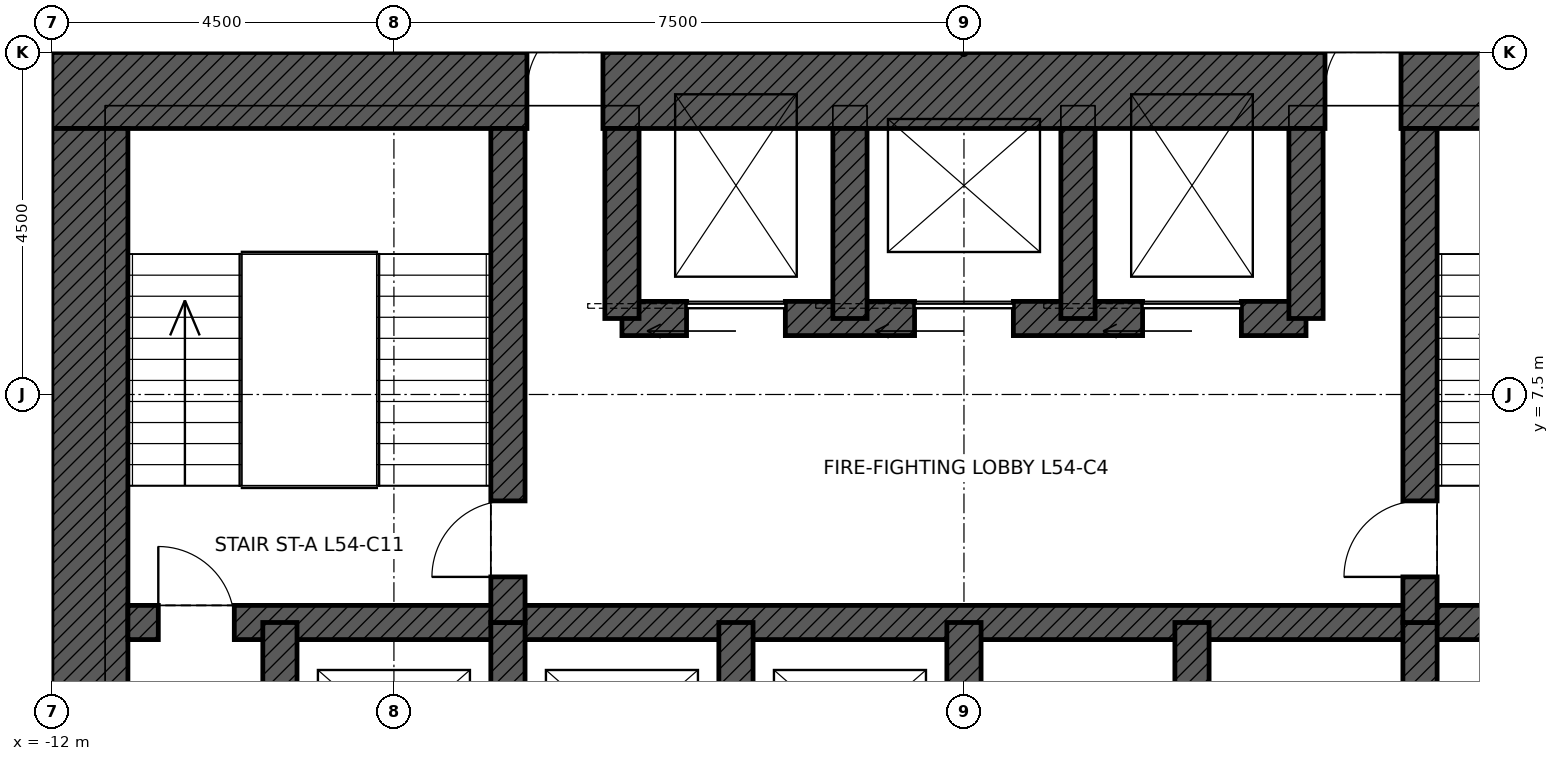
"""IFC4 building model, lengths in metres.
Left out: names, types, materials, properties, quantities, classifications, styles, units other than length and angle.
Written with IfcOpenShell. Run it as: python <this file> out.ifc"""

import sys

from ifc_helpers import new_model, si_unit, direction, frame, frame_2d, origin, place, context, subcontext, project, spatial, rectangle, extrude, element, fill, save


model = new_model("IFC4")
c1 = context("Model", 3, precision=1e-05, world=origin(), true_north=direction((0.0, 1.0)))
c2 = subcontext(c1, "Body", "Model", "MODEL_VIEW")
j1 = project(units=[si_unit("LENGTHUNIT", "METRE"), si_unit("PLANEANGLEUNIT", "RADIAN")], contexts=[c1])
p1 = place(None, origin())
s1 = spatial("IfcSite", under=j1, at=p1, CompositionType="ELEMENT")
p2 = place(p1, origin())
s2 = spatial("IfcBuilding", under=s1, at=p2, CompositionType="ELEMENT")
p3 = place(p2, frame((0.0, 0.0, 249.9)))
s3 = spatial("IfcBuildingStorey", under=s2, at=p3, CompositionType="ELEMENT", Elevation=249.9)
p4 = place(p3, frame((-12.0, 11.5, 0.0), z_axis=(0.0, 0.0, 1.0), x_axis=(1.0, 0.0, 0.0)))
e1 = element("IfcWall", 1, at=p4, inside=s3, PredefinedType="SHEAR", context=c2, shape_type="SweptSolid", body=[
    extrude(rectangle(XDim=24.0, YDim=1.0, at=frame_2d((12.0, 0.0))), origin(), (0.0, 0.0, 1.0), 4.0),
])
p5 = place(p4, frame((6.25, 0.0, 0.0)))
e2 = element("IfcOpeningElement", 2, at=p5, cuts=e1, PredefinedType="OPENING", context=c2, shape_type="SweptSolid", body=[
    extrude(rectangle(XDim=1.0, YDim=2.4, at=frame_2d((0.5, 1.2))), frame((0.0, 0.51, 0.0), z_axis=(0.0, -1.0, 0.0), x_axis=(1.0, 0.0, 0.0)), (0.0, 0.0, 1.0), 1.02),
])
p6 = place(p4, frame((16.75, 0.0, 0.0)))
e3 = element("IfcOpeningElement", 3, at=p6, cuts=e1, PredefinedType="OPENING", context=c2, shape_type="SweptSolid", body=[
    extrude(rectangle(XDim=1.0, YDim=2.4, at=frame_2d((0.5, 1.2))), frame((0.0, 0.51, 0.0), z_axis=(0.0, -1.0, 0.0), x_axis=(1.0, 0.0, 0.0)), (0.0, 0.0, 1.0), 1.02),
])
p7 = place(p3, frame((-11.5, -11.0, 0.0), z_axis=(0.0, 0.0, 1.0), x_axis=(0.0, 1.0, 0.0)))
e4 = element("IfcWall", 4, at=p7, inside=s3, PredefinedType="SHEAR", context=c2, shape_type="SweptSolid", body=[
    extrude(rectangle(XDim=22.0, YDim=1.0, at=frame_2d((11.0, 0.0))), origin(), (0.0, 0.0, 1.0), 4.0),
])
p8 = place(p7, frame((10.5, 0.0, 0.0)))
e5 = element("IfcOpeningElement", 5, at=p8, cuts=e4, PredefinedType="OPENING", context=c2, shape_type="SweptSolid", body=[
    extrude(rectangle(XDim=1.0, YDim=2.4, at=frame_2d((0.5, 1.2))), frame((0.0, 0.51, 0.0), z_axis=(0.0, -1.0, 0.0), x_axis=(1.0, 0.0, 0.0)), (0.0, 0.0, 1.0), 1.02),
])
p9 = place(p3, frame((-11.0, 4.5, 0.0), z_axis=(0.0, 0.0, 1.0), x_axis=(1.0, 0.0, 0.0)))
e6 = element("IfcWall", 6, at=p9, inside=s3, PredefinedType="SHEAR", context=c2, shape_type="SweptSolid", body=[
    extrude(rectangle(XDim=22.0, YDim=0.45, at=frame_2d((11.0, 0.0))), origin(), (0.0, 0.0, 1.0), 4.0),
])
p10 = place(p9, frame((0.4, 0.0, 0.0)))
e7 = element("IfcOpeningElement", 7, at=p10, cuts=e6, PredefinedType="OPENING", context=c2, shape_type="SweptSolid", body=[
    extrude(rectangle(XDim=1.0, YDim=2.1, at=frame_2d((0.5, 1.05))), frame((0.0, 0.235, 0.0), z_axis=(0.0, -1.0, 0.0), x_axis=(1.0, 0.0, 0.0)), (0.0, 0.0, 1.0), 0.47),
])
p11 = place(p9, frame((20.6, 0.0, 0.0)))
e8 = element("IfcOpeningElement", 8, at=p11, cuts=e6, PredefinedType="OPENING", context=c2, shape_type="SweptSolid", body=[
    extrude(rectangle(XDim=1.0, YDim=2.1, at=frame_2d((0.5, 1.05))), frame((0.0, 0.235, 0.0), z_axis=(0.0, -1.0, 0.0), x_axis=(1.0, 0.0, 0.0)), (0.0, 0.0, 1.0), 0.47),
])
p12 = place(p3, frame((-4.5, 8.5, 0.0), z_axis=(0.0, 0.0, 1.0), x_axis=(1.0, 0.0, 0.0)))
e9 = element("IfcWall", 9, at=p12, inside=s3, PredefinedType="SHEAR", context=c2, shape_type="SweptSolid", body=[
    extrude(rectangle(XDim=9.0, YDim=0.45, at=frame_2d((4.5, 0.0))), origin(), (0.0, 0.0, 1.0), 4.0),
])
p13 = place(p12, frame((0.85, 0.0, 0.0)))
e10 = element("IfcOpeningElement", 10, at=p13, cuts=e9, PredefinedType="OPENING", context=c2, shape_type="SweptSolid", body=[
    extrude(rectangle(XDim=1.3, YDim=2.4, at=frame_2d((0.65, 1.2))), frame((0.0, 0.235, 0.0), z_axis=(0.0, -1.0, 0.0), x_axis=(1.0, 0.0, 0.0)), (0.0, 0.0, 1.0), 0.47),
])
p14 = place(p12, frame((6.85, 0.0, 0.0)))
e11 = element("IfcOpeningElement", 11, at=p14, cuts=e9, PredefinedType="OPENING", context=c2, shape_type="SweptSolid", body=[
    extrude(rectangle(XDim=1.3, YDim=2.4, at=frame_2d((0.65, 1.2))), frame((0.0, 0.235, 0.0), z_axis=(0.0, -1.0, 0.0), x_axis=(1.0, 0.0, 0.0)), (0.0, 0.0, 1.0), 0.47),
])
p15 = place(p12, frame((3.85, 0.0, 0.0)))
e12 = element("IfcOpeningElement", 12, at=p15, cuts=e9, PredefinedType="OPENING", context=c2, shape_type="SweptSolid", body=[
    extrude(rectangle(XDim=1.3, YDim=2.4, at=frame_2d((0.65, 1.2))), frame((0.0, 0.235, 0.0), z_axis=(0.0, -1.0, 0.0), x_axis=(1.0, 0.0, 0.0)), (0.0, 0.0, 1.0), 0.47),
])
for number, where, z_axis, x_axis in (
    (13, (-9.0, 1.5, 0.0), (0.0, 0.0, 1.0), (0.0, 1.0, 0.0)),
    (14, (-6.0, 1.5, 0.0), (0.0, 0.0, 1.0), (0.0, 1.0, 0.0)),
    (15, (-3.0, 1.5, 0.0), (0.0, 0.0, 1.0), (0.0, 1.0, 0.0)),
    (16, (0.0, 1.5, 0.0), (0.0, 0.0, 1.0), (0.0, 1.0, 0.0)),
    (17, (3.0, 1.5, 0.0), (0.0, 0.0, 1.0), (0.0, 1.0, 0.0)),
    (18, (6.0, 1.5, 0.0), (0.0, 0.0, 1.0), (0.0, 1.0, 0.0)),
):
    element("IfcWall", number, at=place(p3, frame(where, z_axis=z_axis, x_axis=x_axis)), inside=s3, PredefinedType="SHEAR", context=c2, shape_type="SweptSolid", body=[
        extrude(rectangle(XDim=3.0, YDim=0.45, at=frame_2d((1.5, 0.0))), origin(), (0.0, 0.0, 1.0), 4.0),
    ])
p16 = place(p3, frame((-6.0, 4.5, 0.0), z_axis=(0.0, 0.0, 1.0), x_axis=(0.0, 1.0, 0.0)))
e19 = element("IfcWall", 19, at=p16, inside=s3, PredefinedType="SHEAR", context=c2, shape_type="SweptSolid", body=[
    extrude(rectangle(XDim=6.5, YDim=0.45, at=frame_2d((3.25, 0.0))), origin(), (0.0, 0.0, 1.0), 4.0),
])
p17 = place(p16, frame((0.6, 0.0, 0.0)))
e20 = element("IfcOpeningElement", 20, at=p17, cuts=e19, PredefinedType="OPENING", context=c2, shape_type="SweptSolid", body=[
    extrude(rectangle(XDim=1.0, YDim=2.1, at=frame_2d((0.5, 1.05))), frame((0.0, 0.235, 0.0), z_axis=(0.0, -1.0, 0.0), x_axis=(1.0, 0.0, 0.0)), (0.0, 0.0, 1.0), 0.47),
])
p18 = place(p3, frame((6.0, 4.5, 0.0), z_axis=(0.0, 0.0, 1.0), x_axis=(0.0, 1.0, 0.0)))
e21 = element("IfcWall", 21, at=p18, inside=s3, PredefinedType="SHEAR", context=c2, shape_type="SweptSolid", body=[
    extrude(rectangle(XDim=6.5, YDim=0.45, at=frame_2d((3.25, 0.0))), origin(), (0.0, 0.0, 1.0), 4.0),
])
p19 = place(p18, frame((0.6, 0.0, 0.0)))
e22 = element("IfcOpeningElement", 22, at=p19, cuts=e21, PredefinedType="OPENING", context=c2, shape_type="SweptSolid", body=[
    extrude(rectangle(XDim=1.0, YDim=2.1, at=frame_2d((0.5, 1.05))), frame((0.0, 0.235, 0.0), z_axis=(0.0, -1.0, 0.0), x_axis=(1.0, 0.0, 0.0)), (0.0, 0.0, 1.0), 0.47),
])
for number, where, z_axis, x_axis in (
    (23, (-4.5, 8.5, 0.0), (0.0, 0.0, 1.0), (0.0, 1.0, 0.0)),
    (24, (4.5, 8.5, 0.0), (0.0, 0.0, 1.0), (0.0, 1.0, 0.0)),
    (25, (-1.5, 8.5, 0.0), (0.0, 0.0, 1.0), (0.0, 1.0, 0.0)),
    (26, (1.5, 8.5, 0.0), (0.0, 0.0, 1.0), (0.0, 1.0, 0.0)),
):
    element("IfcWall", number, at=place(p3, frame(where, z_axis=z_axis, x_axis=x_axis)), inside=s3, PredefinedType="SHEAR", context=c2, shape_type="SweptSolid", body=[
        extrude(rectangle(XDim=2.5, YDim=0.45, at=frame_2d((1.25, 0.0))), origin(), (0.0, 0.0, 1.0), 4.0),
    ])
p20 = place(p10, origin())
e27 = element("IfcDoor", 27, at=p20, inside=s3, OperationType="SINGLE_SWING_LEFT", PredefinedType="DOOR", context=c2, shape_type="SweptSolid", body=[
    extrude(rectangle(XDim=1.0, YDim=2.1, at=frame_2d((0.5, 1.05))), frame((0.0, 0.025, 0.0), z_axis=(0.0, -1.0, 0.0), x_axis=(1.0, 0.0, 0.0)), (0.0, 0.0, 1.0), 0.05),
])
fill(e7, e27)
p21 = place(p17, origin())
e28 = element("IfcDoor", 28, at=p21, inside=s3, OperationType="SINGLE_SWING_LEFT", PredefinedType="DOOR", context=c2, shape_type="SweptSolid", body=[
    extrude(rectangle(XDim=1.0, YDim=2.1, at=frame_2d((0.5, 1.05))), frame((0.0, 0.025, 0.0), z_axis=(0.0, -1.0, 0.0), x_axis=(1.0, 0.0, 0.0)), (0.0, 0.0, 1.0), 0.05),
])
fill(e20, e28)
p22 = place(p19, origin())
e29 = element("IfcDoor", 29, at=p22, inside=s3, OperationType="SINGLE_SWING_LEFT", PredefinedType="DOOR", context=c2, shape_type="SweptSolid", body=[
    extrude(rectangle(XDim=1.0, YDim=2.1, at=frame_2d((0.5, 1.05))), frame((0.0, 0.025, 0.0), z_axis=(0.0, -1.0, 0.0), x_axis=(1.0, 0.0, 0.0)), (0.0, 0.0, 1.0), 0.05),
])
fill(e22, e29)
p23 = place(p5, origin())
e30 = element("IfcDoor", 30, at=p23, inside=s3, OperationType="SINGLE_SWING_RIGHT", PredefinedType="DOOR", context=c2, shape_type="SweptSolid", body=[
    extrude(rectangle(XDim=1.0, YDim=2.4, at=frame_2d((0.5, 1.2))), frame((0.0, 0.485, 0.0), z_axis=(0.0, -1.0, 0.0), x_axis=(1.0, 0.0, 0.0)), (0.0, 0.0, 1.0), 0.05),
])
fill(e2, e30)
p24 = place(p6, origin())
e31 = element("IfcDoor", 31, at=p24, inside=s3, OperationType="SINGLE_SWING_RIGHT", PredefinedType="DOOR", context=c2, shape_type="SweptSolid", body=[
    extrude(rectangle(XDim=1.0, YDim=2.4, at=frame_2d((0.5, 1.2))), frame((0.0, 0.485, 0.0), z_axis=(0.0, -1.0, 0.0), x_axis=(1.0, 0.0, 0.0)), (0.0, 0.0, 1.0), 0.05),
])
fill(e3, e31)
p25 = place(p13, origin())
e32 = element("IfcDoor", 32, at=p25, inside=s3, OperationType="SLIDING_TO_LEFT", PredefinedType="DOOR", context=c2, shape_type="SweptSolid", body=[
    extrude(rectangle(XDim=1.3, YDim=2.4, at=frame_2d((0.65, 1.2))), frame((0.0, 0.025, 0.0), z_axis=(0.0, -1.0, 0.0), x_axis=(1.0, 0.0, 0.0)), (0.0, 0.0, 1.0), 0.05),
])
fill(e10, e32)
p26 = place(p14, origin())
e33 = element("IfcDoor", 33, at=p26, inside=s3, OperationType="SLIDING_TO_LEFT", PredefinedType="DOOR", context=c2, shape_type="SweptSolid", body=[
    extrude(rectangle(XDim=1.3, YDim=2.4, at=frame_2d((0.65, 1.2))), frame((0.0, 0.025, 0.0), z_axis=(0.0, -1.0, 0.0), x_axis=(1.0, 0.0, 0.0)), (0.0, 0.0, 1.0), 0.05),
])
fill(e11, e33)
p27 = place(p15, origin())
e34 = element("IfcDoor", 34, at=p27, inside=s3, OperationType="SLIDING_TO_LEFT", PredefinedType="DOOR", context=c2, shape_type="SweptSolid", body=[
    extrude(rectangle(XDim=1.3, YDim=2.4, at=frame_2d((0.65, 1.2))), frame((0.0, 0.025, 0.0), z_axis=(0.0, -1.0, 0.0), x_axis=(1.0, 0.0, 0.0)), (0.0, 0.0, 1.0), 0.05),
])
fill(e12, e34)
save(model, sys.argv[1])
